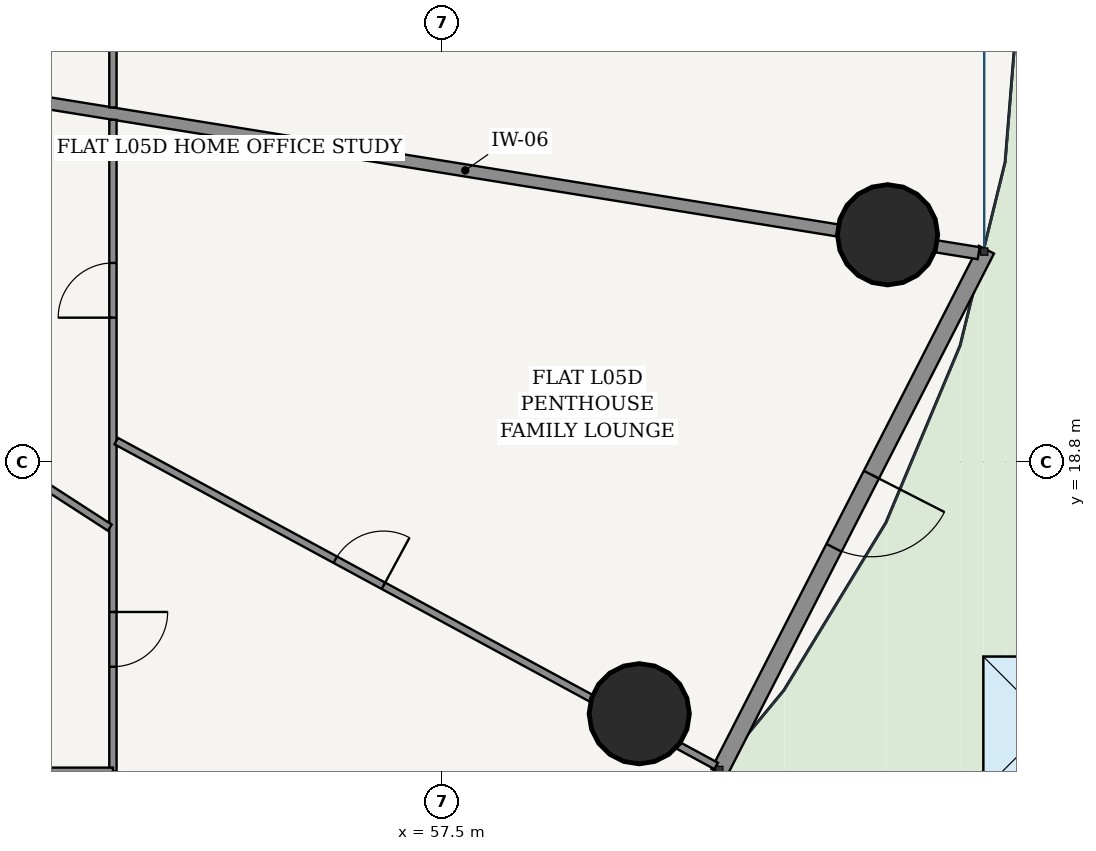
"""IFC4 building model, lengths in metres.
Left out: names, types, materials, properties, quantities, classifications, styles, units other than length and angle.
Written with IfcOpenShell. Run it as: python <this file> out.ifc"""

import sys

from ifc_helpers import new_model, si_unit, direction, frame, frame_2d, origin, origin_2d, place, context, subcontext, project, spatial, rectangle, hollow_circle, extrude, source, transform, mapped, element, fill, save


model = new_model("IFC4")
c1 = context("Model", 3, precision=1e-05, world=origin(), true_north=direction((-0.2419218956, 0.970295726276)))
c2 = subcontext(c1, "Body", "Model", "MODEL_VIEW")
j1 = project(units=[si_unit("LENGTHUNIT", "METRE"), si_unit("PLANEANGLEUNIT", "RADIAN")], contexts=[c1])
p1 = place(None, origin())
s1 = spatial("IfcSite", under=j1, at=p1, CompositionType="ELEMENT")
p2 = place(p1, origin())
s2 = spatial("IfcBuilding", under=s1, at=p2, CompositionType="ELEMENT")
p3 = place(p2, frame((0.0, 0.0, 24.0)))
s3 = spatial("IfcBuildingStorey", under=s2, at=p3, CompositionType="ELEMENT", Elevation=24.0)
for number, where, z_axis, x_axis in (
    (1, (60.741, 14.661, 0.0), (0.0, 0.0, 1.0), (1.0, 0.0, 0.0)),
    (2, (64.824, 22.537, 0.0), (0.0, 0.0, 1.0), (1.0, 0.0, 0.0)),
):
    element("IfcColumn", number, at=place(p3, frame(where, z_axis=z_axis, x_axis=x_axis)), inside=s3, PredefinedType="COLUMN", context=c2, shape_type="SweptSolid", body=[
        extrude(hollow_circle(Radius=0.825, WallThickness=0.05, at=origin_2d()), origin(), (0.0, 0.0, 1.0), 3.6),
    ])
p4 = place(p3, frame((62.051, 13.689, 0.0), z_axis=(0.0, 0.0, 1.0), x_axis=(0.455220575541, 0.890378698984, 0.0)))
e3 = element("IfcWall", 3, at=p4, inside=s3, PredefinedType="SOLIDWALL", context=c2, shape_type="SweptSolid", body=[
    extrude(rectangle(XDim=9.662, YDim=0.28, at=frame_2d((4.831, 0.0))), origin(), (0.0, 0.0, 1.0), 3.32),
])
p5 = place(p4, frame((4.156, 0.0, 0.0)))
e4 = element("IfcOpeningElement", 4, at=p5, cuts=e3, PredefinedType="OPENING", context=c2, shape_type="SweptSolid", body=[
    extrude(rectangle(XDim=1.35, YDim=2.2, at=frame_2d((0.675, 1.1))), frame((0.0, 0.15, 0.0), z_axis=(0.0, -1.0, 0.0), x_axis=(1.0, 0.0, 0.0)), (0.0, 0.0, 1.0), 0.3),
])
p6 = place(p3, frame((49.435, 24.957, 0.0), z_axis=(0.0, 0.0, 1.0), x_axis=(0.987258195973, -0.159126536076, 0.0)))
e5 = element("IfcWall", 5, at=p6, inside=s3, PredefinedType="PARTITIONING", context=c2, shape_type="SweptSolid", body=[
    extrude(rectangle(XDim=17.105, YDim=0.2, at=frame_2d((8.553, 0.0))), origin(), (0.0, 0.0, 1.0), 2.688),
])
p7 = place(p3, frame((52.085, 39.885, 0.0), z_axis=(0.0, 0.0, 1.0), x_axis=(0.0, -1.0, 0.0)))
e6 = element("IfcWall", 6, at=p7, inside=s3, PredefinedType="PARTITIONING", context=c2, shape_type="SweptSolid", body=[
    extrude(rectangle(XDim=15.253, YDim=0.12, at=frame_2d((7.627, 0.0))), origin(), (0.0, 0.0, 1.0), 2.688),
])
p8 = place(p7, frame((9.002, 0.0, 0.0)))
e7 = element("IfcOpeningElement", 7, at=p8, cuts=e6, PredefinedType="OPENING", context=c2, shape_type="SweptSolid", body=[
    extrude(rectangle(XDim=0.9, YDim=2.15, at=frame_2d((0.45, 1.075))), frame((0.0, 0.07, 0.0), z_axis=(0.0, -1.0, 0.0), x_axis=(1.0, 0.0, 0.0)), (0.0, 0.0, 1.0), 0.14),
])
p9 = place(p3, frame((52.085, 24.428, 0.0), z_axis=(0.0, 0.0, 1.0), x_axis=(0.0, -1.0, 0.0)))
e8 = element("IfcWall", 8, at=p9, inside=s3, PredefinedType="PARTITIONING", context=c2, shape_type="SweptSolid", body=[
    extrude(rectangle(XDim=10.713, YDim=0.12, at=frame_2d((5.356, 0.0))), origin(), (0.0, 0.0, 1.0), 2.688),
])
p10 = place(p9, frame((8.094, 0.0, 0.0)))
e9 = element("IfcOpeningElement", 9, at=p10, cuts=e8, PredefinedType="OPENING", context=c2, shape_type="SweptSolid", body=[
    extrude(rectangle(XDim=0.9, YDim=2.15, at=frame_2d((0.45, 1.075))), frame((0.0, 0.07, 0.0), z_axis=(0.0, -1.0, 0.0), x_axis=(1.0, 0.0, 0.0)), (0.0, 0.0, 1.0), 0.14),
])
p11 = place(p9, frame((2.354, 0.0, 0.0)))
e10 = element("IfcOpeningElement", 10, at=p11, cuts=e8, PredefinedType="OPENING", context=c2, shape_type="SweptSolid", body=[
    extrude(rectangle(XDim=0.9, YDim=2.15, at=frame_2d((0.45, 1.075))), frame((0.0, 0.07, 0.0), z_axis=(0.0, -1.0, 0.0), x_axis=(1.0, 0.0, 0.0)), (0.0, 0.0, 1.0), 0.14),
])
p12 = place(p3, frame((52.085, 13.715, 0.0), z_axis=(0.0, 0.0, 1.0), x_axis=(-1.0, 0.0, 0.0)))
e11 = element("IfcWall", 11, at=p12, inside=s3, PredefinedType="PARTITIONING", context=c2, shape_type="SweptSolid", body=[
    extrude(rectangle(XDim=17.195, YDim=0.12, at=frame_2d((8.597, 0.0))), origin(), (0.0, 0.0, 1.0), 2.688),
])
p13 = place(p12, frame((9.191, 0.0, 0.0)))
e12 = element("IfcOpeningElement", 12, at=p13, cuts=e11, PredefinedType="OPENING", context=c2, shape_type="SweptSolid", body=[
    extrude(rectangle(XDim=0.9, YDim=2.15, at=frame_2d((0.45, 1.075))), frame((0.0, 0.07, 0.0), z_axis=(0.0, -1.0, 0.0), x_axis=(1.0, 0.0, 0.0)), (0.0, 0.0, 1.0), 0.14),
])
p14 = place(p3, frame((48.829, 13.667, 0.0), z_axis=(0.0, 0.0, 1.0), x_axis=(0.636177533893, -0.771542704826, 0.0)))
e13 = element("IfcWall", 13, at=p14, inside=s3, PredefinedType="PARTITIONING", context=c2, shape_type="SweptSolid", body=[
    extrude(rectangle(XDim=8.187, YDim=0.12, at=frame_2d((4.093, 0.0))), origin(), (0.0, 0.0, 1.0), 2.688),
])
p15 = place(p3, frame((52.139, 19.144, 0.0), z_axis=(0.0, 0.0, 1.0), x_axis=(0.879372452045, -0.476134529922, 0.0)))
e14 = element("IfcWall", 14, at=p15, inside=s3, PredefinedType="PARTITIONING", context=c2, shape_type="SweptSolid", body=[
    extrude(rectangle(XDim=11.219, YDim=0.12, at=frame_2d((5.61, 0.0))), origin(), (0.0, 0.0, 1.0), 2.688),
])
p16 = place(p15, frame((4.097, 0.0, 0.0)))
e15 = element("IfcOpeningElement", 15, at=p16, cuts=e14, PredefinedType="OPENING", context=c2, shape_type="SweptSolid", body=[
    extrude(rectangle(XDim=0.9, YDim=2.15, at=frame_2d((0.45, 1.075))), frame((0.0, 0.07, 0.0), z_axis=(0.0, -1.0, 0.0), x_axis=(1.0, 0.0, 0.0)), (0.0, 0.0, 1.0), 0.14),
])
p17 = place(p3, frame((49.435, 19.402, 0.0), z_axis=(0.0, 0.0, 1.0), x_axis=(0.839582858019, -0.543231649042, 0.0)))
e16 = element("IfcWall", 16, at=p17, inside=s3, PredefinedType="PARTITIONING", context=c2, shape_type="SweptSolid", body=[
    extrude(rectangle(XDim=3.094, YDim=0.12, at=frame_2d((1.547, 0.0))), origin(), (0.0, 0.0, 1.0), 3.32),
])
m1 = source(origin(), c2, "Body", "SweptSolid", [
    extrude(rectangle(XDim=1.35, YDim=2.2, at=frame_2d((0.675, 1.1))), frame((0.0, 0.025, 0.0), z_axis=(0.0, -1.0, 0.0), x_axis=(1.0, 0.0, 0.0)), (0.0, 0.0, 1.0), 0.05),
])
p18 = place(p5, frame((1.35, 0.0, 0.0), z_axis=(0.0, 0.0, 1.0), x_axis=(-1.0, 0.0, 0.0)))
e17 = element("IfcDoor", 17, at=p18, inside=s3, OperationType="SINGLE_SWING_LEFT", PredefinedType="DOOR", context=c2, shape_type="MappedRepresentation", body=[
    mapped(m1, transform((0.0, 0.0, 0.0), scale=1.0)),
])
fill(e4, e17)
p19 = place(p3, frame((0.0, 0.0, -0.3)))
p20 = place(p19, frame((67.5, 14.5, 0.0)))
p21 = place(p20, frame((0.0, 0.0, 0.26)))
e18 = element("IfcWindow", 18, at=p21, inside=s3, PartitioningType="SINGLE_PANEL", PredefinedType="SKYLIGHT", context=c2, shape_type="SweptSolid", body=[
    extrude(rectangle(XDim=2.2, YDim=2.2, at=origin_2d()), origin(), (0.0, 0.0, 1.0), 0.04),
])
m2 = source(origin(), c2, "Body", "SweptSolid", [
    extrude(rectangle(XDim=0.9, YDim=2.15, at=frame_2d((0.45, 1.075))), frame((0.0, 0.025, 0.0), z_axis=(0.0, -1.0, 0.0), x_axis=(1.0, 0.0, 0.0)), (0.0, 0.0, 1.0), 0.05),
])
p22 = place(p10, origin())
e19 = element("IfcDoor", 19, at=p22, inside=s3, OperationType="SINGLE_SWING_LEFT", PredefinedType="DOOR", context=c2, shape_type="MappedRepresentation", body=[
    mapped(m2, transform((0.0, 0.0, 0.0), scale=1.0)),
])
fill(e9, e19)
p23 = place(p16, origin())
e20 = element("IfcDoor", 20, at=p23, inside=s3, OperationType="SINGLE_SWING_RIGHT", PredefinedType="DOOR", context=c2, shape_type="MappedRepresentation", body=[
    mapped(m2, transform((0.0, 0.0, 0.0), scale=1.0)),
])
fill(e15, e20)
p24 = place(p11, frame((0.9, 0.0, 0.0), z_axis=(0.0, 0.0, 1.0), x_axis=(-1.0, 0.0, 0.0)))
e21 = element("IfcDoor", 21, at=p24, inside=s3, OperationType="SINGLE_SWING_LEFT", PredefinedType="DOOR", context=c2, shape_type="MappedRepresentation", body=[
    mapped(m2, transform((0.0, 0.0, 0.0), scale=1.0)),
])
fill(e10, e21)
save(model, sys.argv[1])
